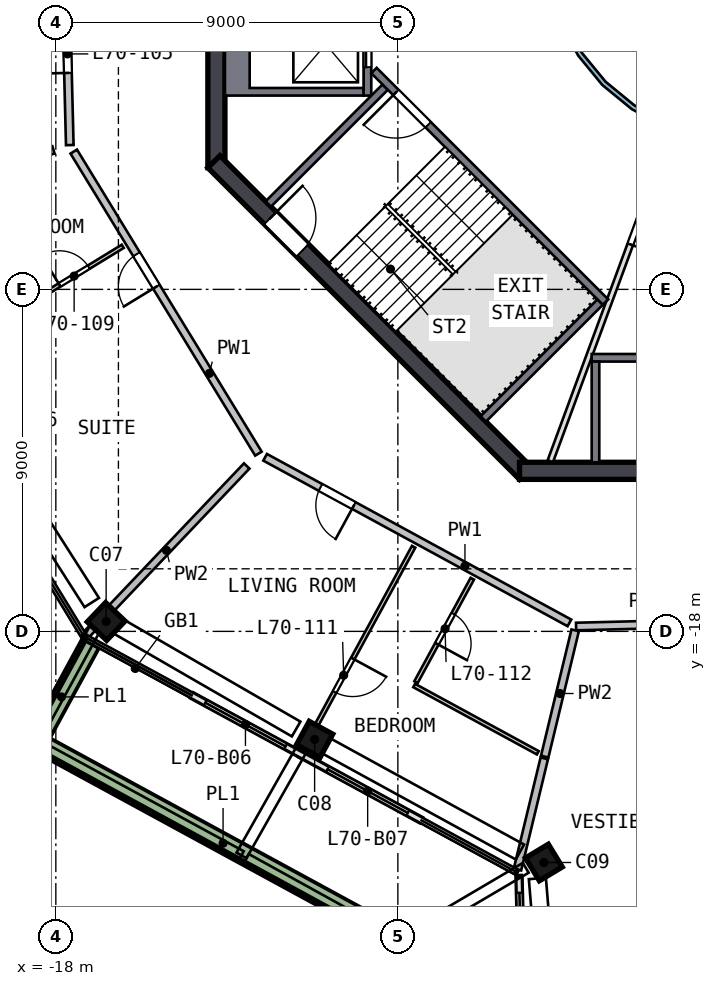
"""IFC4 building model, lengths in metres.
Left out: names, types, materials, properties, quantities, classifications, styles, units other than length and angle.
Written with IfcOpenShell. Run it as: python <this file> out.ifc"""

import sys

from ifc_helpers import new_model, si_unit, direction, frame, frame_2d, origin, origin_2d, place, context, subcontext, project, spatial, polyline, rectangle, outline, extrude, element, fill, save


model = new_model("IFC4")
c1 = context("Model", 3, precision=1e-05, world=origin(), true_north=direction((0.0, 1.0)))
c2 = subcontext(c1, "Body", "Model", "MODEL_VIEW")
j1 = project(units=[si_unit("LENGTHUNIT", "METRE"), si_unit("PLANEANGLEUNIT", "RADIAN")], contexts=[c1])
p1 = place(None, origin())
s1 = spatial("IfcSite", under=j1, at=p1, CompositionType="ELEMENT")
p2 = place(p1, origin())
s2 = spatial("IfcBuilding", under=s1, at=p2, CompositionType="ELEMENT")
p3 = place(p2, frame((0.0, 0.0, 284.5)))
s3 = spatial("IfcBuildingStorey", under=s2, at=p3, CompositionType="ELEMENT", Elevation=284.5)
p4 = place(p3, frame((-16.779, -17.644, 0.0), z_axis=(0.084609865, -0.079060431, 0.993272681), x_axis=(-0.719963223, 0.684283954, 0.115794763)))
e1 = element("IfcColumn", 1, at=p4, inside=s3, PredefinedType="COLUMN", context=c2, shape_type="SweptSolid", body=[
    extrude(rectangle(XDim=0.7, YDim=0.7, at=origin_2d()), origin(), (0.0, 0.0, 1.0), 3.211),
])
p5 = place(p3, frame((-11.311, -20.78, 0.0), z_axis=(0.099318662, -0.053005442, 0.993642907), x_axis=(0.872612609, -0.475262413, -0.112573854)))
e2 = element("IfcColumn", 2, at=p5, inside=s3, PredefinedType="COLUMN", context=c2, shape_type="SweptSolid", body=[
    extrude(rectangle(XDim=0.7, YDim=0.7, at=origin_2d()), origin(), (0.0, 0.0, 1.0), 3.21),
])
p6 = place(p3, frame((-5.297, -24.052, 0.0), z_axis=(0.11454425, -0.024246593, 0.993122207), x_axis=(-0.513885456, 0.854108924, 0.080122924)))
e3 = element("IfcColumn", 3, at=p6, inside=s3, PredefinedType="COLUMN", context=c2, shape_type="SweptSolid", body=[
    extrude(rectangle(XDim=0.7, YDim=0.7, at=origin_2d()), origin(), (0.0, 0.0, 1.0), 3.212),
])
p7 = place(p3, frame((-13.775, 5.799, 0.0), z_axis=(0.0, 0.0, 1.0), x_axis=(0.0, -1.0, 0.0)))
e4 = element("IfcWall", 4, at=p7, inside=s3, PredefinedType="SHEAR", context=c2, shape_type="SweptSolid", body=[
    extrude(rectangle(XDim=11.598, YDim=0.45, at=frame_2d((5.799, 0.0))), origin(), (0.0, 0.0, 1.0), 3.5),
])
p8 = place(p7, frame((4.899, 0.0, 0.0)))
e5 = element("IfcOpeningElement", 5, at=p8, cuts=e4, PredefinedType="OPENING", context=c2, shape_type="SweptSolid", body=[
    extrude(rectangle(XDim=1.8, YDim=2.1, at=frame_2d((0.9, 1.05))), frame((0.0, 0.235, 0.0), z_axis=(0.0, -1.0, 0.0), x_axis=(1.0, 0.0, 0.0)), (0.0, 0.0, 1.0), 0.47),
])
p9 = place(p3, frame((-13.841, -5.64, 0.0), z_axis=(0.0, 0.0, 1.0), x_axis=(0.707106781, -0.707106781, 0.0)))
e6 = element("IfcWall", 6, at=p9, inside=s3, PredefinedType="SHEAR", context=c2, shape_type="SweptSolid", body=[
    extrude(rectangle(XDim=11.598, YDim=0.45, at=frame_2d((5.799, 0.0))), origin(), (0.0, 0.0, 1.0), 3.5),
])
p10 = place(p9, frame((2.099, 0.0, 0.0)))
e7 = element("IfcOpeningElement", 7, at=p10, cuts=e6, PredefinedType="OPENING", context=c2, shape_type="SweptSolid", body=[
    extrude(rectangle(XDim=1.2, YDim=2.1, at=frame_2d((0.6, 1.05))), frame((0.0, 0.235, 0.0), z_axis=(0.0, -1.0, 0.0), x_axis=(1.0, 0.0, 0.0)), (0.0, 0.0, 1.0), 0.47),
])
p11 = place(p3, frame((-5.799, -13.775, 0.0), z_axis=(0.0, 0.0, 1.0), x_axis=(1.0, 0.0, 0.0)))
e8 = element("IfcWall", 8, at=p11, inside=s3, PredefinedType="SHEAR", context=c2, shape_type="SweptSolid", body=[
    extrude(rectangle(XDim=11.598, YDim=0.45, at=frame_2d((5.799, 0.0))), origin(), (0.0, 0.0, 1.0), 3.5),
])
p12 = place(p3, frame((-14.416, -19.687, 0.0), z_axis=(0.0, 0.0, 1.0), x_axis=(0.878288574, -0.478130925, 0.0)))
e9 = element("IfcWall", 9, at=p12, inside=s3, PredefinedType="SOLIDWALL", context=c2, shape_type="SweptSolid", body=[
    extrude(rectangle(XDim=3.25, YDim=0.15, at=frame_2d((1.625, 0.0))), origin(), (0.0, 0.0, 1.0), 2.525),
])
p13 = place(p12, frame((0.4, 0.0, 0.0)))
e10 = element("IfcOpeningElement", 10, at=p13, cuts=e9, PredefinedType="OPENING", context=c2, shape_type="SweptSolid", body=[
    extrude(rectangle(XDim=2.4, YDim=2.4, at=frame_2d((1.2, 1.2))), frame((0.0, 0.085, 0.0), z_axis=(0.0, -1.0, 0.0), x_axis=(1.0, 0.0, 0.0)), (0.0, 0.0, 1.0), 0.17),
])
p14 = place(p3, frame((-11.562, -21.241, 0.0), z_axis=(0.0, 0.0, 1.0), x_axis=(0.878337007, -0.478041947, 0.0)))
e11 = element("IfcWall", 11, at=p14, inside=s3, PredefinedType="SOLIDWALL", context=c2, shape_type="SweptSolid", body=[
    extrude(rectangle(XDim=3.611, YDim=0.15, at=frame_2d((1.806, 0.0))), origin(), (0.0, 0.0, 1.0), 2.525),
])
p15 = place(p14, frame((0.811, 0.0, 0.0)))
e12 = element("IfcOpeningElement", 12, at=p15, cuts=e11, PredefinedType="OPENING", context=c2, shape_type="SweptSolid", body=[
    extrude(rectangle(XDim=2.4, YDim=2.4, at=frame_2d((1.2, 1.2))), frame((0.0, 0.085, 0.0), z_axis=(0.0, -1.0, 0.0), x_axis=(1.0, 0.0, 0.0)), (0.0, 0.0, 1.0), 0.17),
])
p16 = place(p3, frame((-5.812, -24.482, 0.0), z_axis=(0.0, 0.0, 1.0), x_axis=(0.025100843, -0.999684924, 0.0)))
e13 = element("IfcWall", 13, at=p16, inside=s3, PredefinedType="SOLIDWALL", context=c2, shape_type="SweptSolid", body=[
    extrude(rectangle(XDim=3.2, YDim=0.15, at=frame_2d((1.6, 0.0))), origin(), (0.0, 0.0, 1.0), 2.525),
])
p17 = place(p16, frame((0.4, 0.0, 0.0)))
e14 = element("IfcOpeningElement", 14, at=p17, cuts=e13, PredefinedType="OPENING", context=c2, shape_type="SweptSolid", body=[
    extrude(rectangle(XDim=2.4, YDim=2.4, at=frame_2d((1.2, 1.2))), frame((0.0, 0.085, 0.0), z_axis=(0.0, -1.0, 0.0), x_axis=(1.0, 0.0, 0.0)), (0.0, 0.0, 1.0), 0.17),
])
p18 = place(p3, frame((-17.087, -18.319, 0.0), z_axis=(0.0, 0.0, 1.0), x_axis=(-0.478049873, -0.878332693, 0.0)))
e15 = element("IfcWall", 15, at=p18, inside=s3, PredefinedType="SOLIDWALL", context=c2, shape_type="SweptSolid", body=[
    extrude(rectangle(XDim=3.199, YDim=0.5, at=frame_2d((1.6, 0.0))), origin(), (0.0, 0.0, 1.0), 0.7),
])
p19 = place(p3, frame((-18.278, -21.029, 0.0), z_axis=(0.0, 0.0, 1.0), x_axis=(0.878313905, -0.47808439, 0.0)))
e16 = element("IfcWall", 16, at=p19, inside=s3, PredefinedType="SOLIDWALL", context=c2, shape_type="SweptSolid", body=[
    extrude(rectangle(XDim=10.652, YDim=0.5, at=frame_2d((5.326, 0.0))), origin(), (0.0, 0.0, 1.0), 0.7),
])
p20 = place(p3, origin())
e17 = element("IfcWall", 17, at=p20, inside=s3, PredefinedType="SOLIDWALL", context=c2, shape_type="SweptSolid", body=[
    extrude(outline(polyline([(-13.55, -3.9), (-13.55, -1.2), (-9.9, -1.2), (-9.9, -1.4), (-12.9, -1.4), (-12.9, -3.7), (-9.9, -3.7), (-9.9, -3.9), (-13.55, -3.9)])), origin(), (0.0, 0.0, 1.0), 3.19),
])
p21 = place(p3, frame((-9.8, -1.2, 0.0), z_axis=(0.0, 0.0, 1.0), x_axis=(0.0, -1.0, 0.0)))
e18 = element("IfcWall", 18, at=p21, inside=s3, PredefinedType="SOLIDWALL", context=c2, shape_type="SweptSolid", body=[
    extrude(rectangle(XDim=2.7, YDim=0.2, at=frame_2d((1.35, 0.0))), origin(), (0.0, 0.0, 1.0), 3.19),
])
p22 = place(p21, frame((0.75, 0.0, 0.0)))
e19 = element("IfcOpeningElement", 19, at=p22, cuts=e18, PredefinedType="OPENING", context=c2, shape_type="SweptSolid", body=[
    extrude(rectangle(XDim=1.2, YDim=2.1, at=frame_2d((0.6, 1.05))), frame((0.0, 0.11, 0.0), z_axis=(0.0, -1.0, 0.0), x_axis=(1.0, 0.0, 0.0)), (0.0, 0.0, 1.0), 0.22),
])
p23 = place(p3, frame((-3.9, -10.8, 0.0), z_axis=(0.0, 0.0, 1.0), x_axis=(1.0, 0.0, 0.0)))
e20 = element("IfcWall", 20, at=p23, inside=s3, PredefinedType="SOLIDWALL", context=c2, shape_type="SweptSolid", body=[
    extrude(rectangle(XDim=7.8, YDim=0.2, at=frame_2d((3.9, 0.0))), origin(), (0.0, 0.0, 1.0), 3.19),
])
p24 = place(p23, frame((3.45, 0.0, 0.0)))
e21 = element("IfcOpeningElement", 21, at=p24, cuts=e20, PredefinedType="OPENING", context=c2, shape_type="SweptSolid", body=[
    extrude(rectangle(XDim=0.9, YDim=2.1, at=frame_2d((0.45, 1.05))), frame((0.0, 0.11, 0.0), z_axis=(0.0, -1.0, 0.0), x_axis=(1.0, 0.0, 0.0)), (0.0, 0.0, 1.0), 0.22),
])
p25 = place(p3, frame((-3.8, -10.9, 0.0), z_axis=(0.0, 0.0, 1.0), x_axis=(0.0, -1.0, 0.0)))
e22 = element("IfcWall", 22, at=p25, inside=s3, PredefinedType="SOLIDWALL", context=c2, shape_type="SweptSolid", body=[
    extrude(rectangle(XDim=2.65, YDim=0.2, at=frame_2d((1.325, 0.0))), origin(), (0.0, 0.0, 1.0), 3.19),
])
p26 = place(p3, frame((-3.535, -9.334, 0.0), z_axis=(0.0, 0.0, 1.0), x_axis=(-0.707120946, 0.707092617, 0.0)))
e23 = element("IfcWall", 23, at=p26, inside=s3, PredefinedType="SOLIDWALL", context=c2, shape_type="SweptSolid", body=[
    extrude(rectangle(XDim=8.618, YDim=0.2, at=frame_2d((4.309, 0.0))), origin(), (0.0, 0.0, 1.0), 3.19),
])
p27 = place(p26, frame((6.6, 0.0, 0.0)))
e24 = element("IfcOpeningElement", 24, at=p27, cuts=e23, PredefinedType="OPENING", context=c2, shape_type="SweptSolid", body=[
    extrude(rectangle(XDim=1.2, YDim=2.1, at=frame_2d((0.6, 1.05))), frame((0.0, 0.11, 0.0), z_axis=(0.0, -1.0, 0.0), x_axis=(1.0, 0.0, 0.0)), (0.0, 0.0, 1.0), 0.22),
])
for number, where, z_axis, x_axis in (
    (25, (-9.334, -3.677, 0.0), (0.0, 0.0, 1.0), (-0.707, -0.707, 0.0)),
    (26, (-3.677, -9.334, 0.0), (0.0, 0.0, 1.0), (-0.707, -0.707, 0.0)),
):
    element("IfcWall", number, at=place(p3, frame(where, z_axis=z_axis, x_axis=x_axis)), inside=s3, PredefinedType="SOLIDWALL", context=c2, shape_type="SweptSolid", body=[
        extrude(rectangle(XDim=4.35, YDim=0.2, at=frame_2d((2.175, 0.0))), origin(), (0.0, 0.0, 1.0), 3.19),
    ])
p28 = place(p3, frame((-1.776, -4.813, 0.0), z_axis=(0.0, 0.0, 1.0), x_axis=(-0.346114844, -0.938192152, 0.0)))
e27 = element("IfcWall", 27, at=p28, inside=s3, PredefinedType="PARTITIONING", context=c2, shape_type="SweptSolid", body=[
    extrude(rectangle(XDim=9.283, YDim=0.15, at=frame_2d((4.641, 0.0))), origin(), (0.0, 0.0, 1.0), 3.19),
])
p29 = place(p28, frame((1.4, 0.0, 0.0)))
e28 = element("IfcOpeningElement", 28, at=p29, cuts=e27, PredefinedType="OPENING", context=c2, shape_type="SweptSolid", body=[
    extrude(rectangle(XDim=1.8, YDim=2.1, at=frame_2d((0.9, 1.05))), frame((0.0, 0.085, 0.0), z_axis=(0.0, -1.0, 0.0), x_axis=(1.0, 0.0, 0.0)), (0.0, 0.0, 1.0), 0.17),
])
p30 = place(p3, origin())
e29 = element("IfcWall", 29, at=p30, inside=s3, PredefinedType="SOLIDWALL", context=c2, shape_type="SweptSolid", body=[
    extrude(outline(polyline([(5.021, -0.999), (4.73, -1.959), (4.257, -2.844), (3.62, -3.62), (2.844, -4.257), (1.959, -4.73), (0.999, -5.021), (0.0, -5.12), (-0.999, -5.021), (-1.959, -4.73), (-2.844, -4.257), (-3.62, -3.62), (-4.257, -2.844), (-4.73, -1.959), (-5.021, -0.999), (-5.12, 0.0), (-5.021, 0.999), (-4.73, 1.959), (-4.257, 2.844), (-3.62, 3.62), (-2.844, 4.257), (-1.959, 4.73), (-0.999, 5.021), (0.0, 5.12), (0.999, 5.021), (1.959, 4.73), (2.844, 4.257), (3.62, 3.62), (4.257, 2.844), (4.73, 1.959), (5.021, 0.999), (5.12, 0.0), (5.021, -0.999)]), holes=[polyline([(4.904, 0.976), (4.619, 1.913), (4.157, 2.778), (3.535, 3.535), (2.778, 4.157), (1.913, 4.619), (0.976, 4.904), (0.0, 5.0), (-0.976, 4.904), (-1.913, 4.619), (-2.778, 4.157), (-3.535, 3.535), (-4.157, 2.778), (-4.619, 1.913), (-4.904, 0.976), (-5.0, 0.0), (-4.904, -0.976), (-4.619, -1.913), (-4.157, -2.778), (-3.535, -3.535), (-2.778, -4.157), (-1.913, -4.619), (-0.976, -4.904), (0.0, -5.0), (0.976, -4.904), (1.913, -4.619), (2.778, -4.157), (3.535, -3.535), (4.157, -2.778), (4.619, -1.913), (4.904, -0.976), (5.0, 0.0), (4.904, 0.976)])]), origin(), (0.0, 0.0, 1.0), 3.19),
])
p31 = place(p3, frame((-17.633, -5.203, 0.0), z_axis=(0.0, 0.0, 1.0), x_axis=(-0.025130335, 0.999684183, 0.0)))
e30 = element("IfcWall", 30, at=p31, inside=s3, PredefinedType="SOLIDWALL", context=c2, shape_type="SweptSolid", body=[
    extrude(rectangle(XDim=9.317, YDim=0.2, at=frame_2d((4.658, 0.0))), origin(), (0.0, 0.0, 1.0), 3.19),
])
p32 = place(p31, frame((1.9, 0.0, 0.0)))
e31 = element("IfcOpeningElement", 31, at=p32, cuts=e30, PredefinedType="OPENING", context=c2, shape_type="SweptSolid", body=[
    extrude(rectangle(XDim=1.0, YDim=2.1, at=frame_2d((0.5, 1.05))), frame((0.0, 0.11, 0.0), z_axis=(0.0, -1.0, 0.0), x_axis=(1.0, 0.0, 0.0)), (0.0, 0.0, 1.0), 0.22),
])
p33 = place(p3, frame((-12.669, -13.323, 0.0), z_axis=(0.0, 0.0, 1.0), x_axis=(-0.521611117, 0.853183358, 0.0)))
e32 = element("IfcWall", 32, at=p33, inside=s3, PredefinedType="SOLIDWALL", context=c2, shape_type="SweptSolid", body=[
    extrude(rectangle(XDim=9.317, YDim=0.2, at=frame_2d((4.658, 0.0))), origin(), (0.0, 0.0, 1.0), 3.19),
])
p34 = place(p33, frame((5.15, 0.0, 0.0)))
e33 = element("IfcOpeningElement", 33, at=p34, cuts=e32, PredefinedType="OPENING", context=c2, shape_type="SweptSolid", body=[
    extrude(rectangle(XDim=1.0, YDim=2.1, at=frame_2d((0.5, 1.05))), frame((0.0, 0.11, 0.0), z_axis=(0.0, -1.0, 0.0), x_axis=(1.0, 0.0, 0.0)), (0.0, 0.0, 1.0), 0.22),
])
p35 = place(p3, frame((-4.486, -17.777, 0.0), z_axis=(0.0, 0.0, 1.0), x_axis=(-0.878320972, 0.478071407, 0.0)))
e34 = element("IfcWall", 34, at=p35, inside=s3, PredefinedType="SOLIDWALL", context=c2, shape_type="SweptSolid", body=[
    extrude(rectangle(XDim=9.117, YDim=0.2, at=frame_2d((4.558, 0.0))), origin(), (0.0, 0.0, 1.0), 3.19),
])
p36 = place(p35, frame((6.458, 0.0, 0.0)))
e35 = element("IfcOpeningElement", 35, at=p36, cuts=e34, PredefinedType="OPENING", context=c2, shape_type="SweptSolid", body=[
    extrude(rectangle(XDim=1.0, YDim=2.1, at=frame_2d((0.5, 1.05))), frame((0.0, 0.11, 0.0), z_axis=(0.0, -1.0, 0.0), x_axis=(1.0, 0.0, 0.0)), (0.0, 0.0, 1.0), 0.22),
])
p37 = place(p3, frame((5.203, -17.633, 0.0), z_axis=(0.0, 0.0, 1.0), x_axis=(-0.999683918, -0.025140891, 0.0)))
e36 = element("IfcWall", 36, at=p37, inside=s3, PredefinedType="SOLIDWALL", context=c2, shape_type="SweptSolid", body=[
    extrude(rectangle(XDim=9.517, YDim=0.2, at=frame_2d((4.758, 0.0))), origin(), (0.0, 0.0, 1.0), 3.19),
])
p38 = place(p37, frame((3.838, 0.0, 0.0)))
e37 = element("IfcOpeningElement", 37, at=p38, cuts=e36, PredefinedType="OPENING", context=c2, shape_type="SweptSolid", body=[
    extrude(rectangle(XDim=1.8, YDim=2.1, at=frame_2d((0.9, 1.05))), frame((0.0, 0.11, 0.0), z_axis=(0.0, -1.0, 0.0), x_axis=(1.0, 0.0, 0.0)), (0.0, 0.0, 1.0), 0.22),
])
p39 = place(p3, frame((-18.062, -5.33, 0.0), z_axis=(0.0, 0.0, 1.0), x_axis=(-0.959121115, -0.282995915, 0.0)))
e38 = element("IfcWall", 38, at=p39, inside=s3, PredefinedType="SOLIDWALL", context=c2, shape_type="SweptSolid", body=[
    extrude(rectangle(XDim=3.075, YDim=0.2, at=frame_2d((1.537, 0.0))), origin(), (0.0, 0.0, 1.0), 3.19),
])
p40 = place(p3, frame((-12.977, -13.647, 0.0), z_axis=(0.0, 0.0, 1.0), x_axis=(-0.689127097, -0.724640493, 0.0)))
e39 = element("IfcWall", 39, at=p40, inside=s3, PredefinedType="SOLIDWALL", context=c2, shape_type="SweptSolid", body=[
    extrude(rectangle(XDim=6.132, YDim=0.2, at=frame_2d((3.066, 0.0))), origin(), (0.0, 0.0, 1.0), 3.19),
])
p41 = place(p3, frame((-5.853, -24.268, 0.0), z_axis=(0.0, 0.0, 1.0), x_axis=(0.234458255, 0.972126189, 0.0)))
e40 = element("IfcWall", 40, at=p41, inside=s3, PredefinedType="SOLIDWALL", context=c2, shape_type="SweptSolid", body=[
    extrude(rectangle(XDim=3.011, YDim=0.2, at=frame_2d((1.506, 0.0))), origin(), (0.0, 0.0, 1.0), 3.19),
])
p42 = place(p3, frame((-5.136, -21.296, 0.0), z_axis=(0.0, 0.0, 1.0), x_axis=(0.234461345, 0.972125443, 0.0)))
e41 = element("IfcWall", 41, at=p42, inside=s3, PredefinedType="SOLIDWALL", context=c2, shape_type="SweptSolid", body=[
    extrude(rectangle(XDim=3.418, YDim=0.2, at=frame_2d((1.709, 0.0))), origin(), (0.0, 0.0, 1.0), 3.19),
])
p43 = place(p3, frame((-18.884, -9.484, 0.0), z_axis=(0.0, 0.0, 1.0), x_axis=(0.85318253, 0.521612471, 0.0)))
e42 = element("IfcWall", 42, at=p43, inside=s3, PredefinedType="PARTITIONING", context=c2, shape_type="SweptSolid", body=[
    extrude(rectangle(XDim=3.1, YDim=0.1, at=frame_2d((1.55, 0.0))), origin(), (0.0, 0.0, 1.0), 3.19),
])
p44 = place(p43, frame((1.15, 0.0, 0.0)))
e43 = element("IfcOpeningElement", 43, at=p44, cuts=e42, PredefinedType="OPENING", context=c2, shape_type="SweptSolid", body=[
    extrude(rectangle(XDim=0.9, YDim=2.1, at=frame_2d((0.45, 1.05))), frame((0.0, 0.06, 0.0), z_axis=(0.0, -1.0, 0.0), x_axis=(1.0, 0.0, 0.0)), (0.0, 0.0, 1.0), 0.12),
])
p45 = place(p3, frame((-8.585, -15.773, 0.0), z_axis=(0.0, 0.0, 1.0), x_axis=(-0.478081504, -0.878315476, 0.0)))
e44 = element("IfcWall", 44, at=p45, inside=s3, PredefinedType="PARTITIONING", context=c2, shape_type="SweptSolid", body=[
    extrude(rectangle(XDim=6.15, YDim=0.1, at=frame_2d((3.075, 0.0))), origin(), (0.0, 0.0, 1.0), 3.19),
])
p46 = place(p45, frame((3.35, 0.0, 0.0)))
e45 = element("IfcOpeningElement", 45, at=p46, cuts=e44, PredefinedType="OPENING", context=c2, shape_type="SweptSolid", body=[
    extrude(rectangle(XDim=1.0, YDim=2.1, at=frame_2d((0.5, 1.05))), frame((0.0, 0.06, 0.0), z_axis=(0.0, -1.0, 0.0), x_axis=(1.0, 0.0, 0.0)), (0.0, 0.0, 1.0), 0.12),
])
p47 = place(p3, frame((-7.041, -16.614, 0.0), z_axis=(0.0, 0.0, 1.0), x_axis=(-0.478129117, -0.878289558, 0.0)))
e46 = element("IfcWall", 46, at=p47, inside=s3, PredefinedType="PARTITIONING", context=c2, shape_type="SweptSolid", body=[
    extrude(rectangle(XDim=3.1, YDim=0.1, at=frame_2d((1.55, 0.0))), origin(), (0.0, 0.0, 1.0), 3.19),
])
p48 = place(p47, frame((1.05, 0.0, 0.0)))
e47 = element("IfcOpeningElement", 47, at=p48, cuts=e46, PredefinedType="OPENING", context=c2, shape_type="SweptSolid", body=[
    extrude(rectangle(XDim=0.9, YDim=2.1, at=frame_2d((0.45, 1.05))), frame((0.0, 0.06, 0.0), z_axis=(0.0, -1.0, 0.0), x_axis=(1.0, 0.0, 0.0)), (0.0, 0.0, 1.0), 0.12),
])
p49 = place(p3, frame((-8.571, -19.424, 0.0), z_axis=(0.0, 0.0, 1.0), x_axis=(0.878330978, -0.478053023, 0.0)))
e48 = element("IfcWall", 48, at=p49, inside=s3, PredefinedType="PARTITIONING", context=c2, shape_type="SweptSolid", body=[
    extrude(rectangle(XDim=3.704, YDim=0.1, at=frame_2d((1.852, 0.0))), origin(), (0.0, 0.0, 1.0), 3.19),
])
p50 = place(p13, origin())
e49 = element("IfcDoor", 49, at=p50, inside=s3, OperationType="SLIDING_TO_RIGHT", PredefinedType="DOOR", context=c2, shape_type="SweptSolid", body=[
    extrude(rectangle(XDim=2.4, YDim=2.4, at=frame_2d((1.2, 1.2))), frame((0.0, 0.025, 0.0), z_axis=(0.0, -1.0, 0.0), x_axis=(1.0, 0.0, 0.0)), (0.0, 0.0, 1.0), 0.05),
])
fill(e10, e49)
p51 = place(p15, origin())
e50 = element("IfcDoor", 50, at=p51, inside=s3, OperationType="SLIDING_TO_LEFT", PredefinedType="DOOR", context=c2, shape_type="SweptSolid", body=[
    extrude(rectangle(XDim=2.4, YDim=2.4, at=frame_2d((1.2, 1.2))), frame((0.0, 0.025, 0.0), z_axis=(0.0, -1.0, 0.0), x_axis=(1.0, 0.0, 0.0)), (0.0, 0.0, 1.0), 0.05),
])
fill(e12, e50)
p52 = place(p17, origin())
e51 = element("IfcDoor", 51, at=p52, inside=s3, OperationType="SLIDING_TO_LEFT", PredefinedType="DOOR", context=c2, shape_type="SweptSolid", body=[
    extrude(rectangle(XDim=2.4, YDim=2.4, at=frame_2d((1.2, 1.2))), frame((0.0, 0.025, 0.0), z_axis=(0.0, -1.0, 0.0), x_axis=(1.0, 0.0, 0.0)), (0.0, 0.0, 1.0), 0.05),
])
fill(e14, e51)
p53 = place(p22, origin())
e52 = element("IfcDoor", 52, at=p53, inside=s3, OperationType="DOUBLE_DOOR_SLIDING", PredefinedType="DOOR", context=c2, shape_type="SweptSolid", body=[
    extrude(rectangle(XDim=1.2, YDim=2.1, at=frame_2d((0.6, 1.05))), frame((0.0, 0.025, 0.0), z_axis=(0.0, -1.0, 0.0), x_axis=(1.0, 0.0, 0.0)), (0.0, 0.0, 1.0), 0.05),
])
fill(e19, e52)
p54 = place(p27, origin())
e53 = element("IfcDoor", 53, at=p54, inside=s3, OperationType="SINGLE_SWING_RIGHT", PredefinedType="DOOR", context=c2, shape_type="SweptSolid", body=[
    extrude(rectangle(XDim=1.2, YDim=2.1, at=frame_2d((0.6, 1.05))), frame((0.0, 0.025, 0.0), z_axis=(0.0, -1.0, 0.0), x_axis=(1.0, 0.0, 0.0)), (0.0, 0.0, 1.0), 0.05),
])
fill(e24, e53)
p55 = place(p10, origin())
e54 = element("IfcDoor", 54, at=p55, inside=s3, OperationType="SINGLE_SWING_LEFT", PredefinedType="DOOR", context=c2, shape_type="SweptSolid", body=[
    extrude(rectangle(XDim=1.2, YDim=2.1, at=frame_2d((0.6, 1.05))), frame((0.0, 0.025, 0.0), z_axis=(0.0, -1.0, 0.0), x_axis=(1.0, 0.0, 0.0)), (0.0, 0.0, 1.0), 0.05),
])
fill(e7, e54)
p56 = place(p29, origin())
e55 = element("IfcDoor", 55, at=p56, inside=s3, OperationType="DOUBLE_DOOR_SINGLE_SWING", PredefinedType="DOOR", context=c2, shape_type="SweptSolid", body=[
    extrude(rectangle(XDim=1.8, YDim=2.1, at=frame_2d((0.9, 1.05))), frame((0.0, 0.025, 0.0), z_axis=(0.0, -1.0, 0.0), x_axis=(1.0, 0.0, 0.0)), (0.0, 0.0, 1.0), 0.05),
])
fill(e28, e55)
p57 = place(p32, origin())
e56 = element("IfcDoor", 56, at=p57, inside=s3, OperationType="SINGLE_SWING_LEFT", PredefinedType="DOOR", context=c2, shape_type="SweptSolid", body=[
    extrude(rectangle(XDim=1.0, YDim=2.1, at=frame_2d((0.5, 1.05))), frame((0.0, 0.025, 0.0), z_axis=(0.0, -1.0, 0.0), x_axis=(1.0, 0.0, 0.0)), (0.0, 0.0, 1.0), 0.05),
])
fill(e31, e56)
p58 = place(p34, origin())
e57 = element("IfcDoor", 57, at=p58, inside=s3, OperationType="SINGLE_SWING_LEFT", PredefinedType="DOOR", context=c2, shape_type="SweptSolid", body=[
    extrude(rectangle(XDim=1.0, YDim=2.1, at=frame_2d((0.5, 1.05))), frame((0.0, 0.025, 0.0), z_axis=(0.0, -1.0, 0.0), x_axis=(1.0, 0.0, 0.0)), (0.0, 0.0, 1.0), 0.05),
])
fill(e33, e57)
p59 = place(p44, origin())
e58 = element("IfcDoor", 58, at=p59, inside=s3, OperationType="SINGLE_SWING_LEFT", PredefinedType="DOOR", context=c2, shape_type="SweptSolid", body=[
    extrude(rectangle(XDim=0.9, YDim=2.1, at=frame_2d((0.45, 1.05))), frame((0.0, 0.025, 0.0), z_axis=(0.0, -1.0, 0.0), x_axis=(1.0, 0.0, 0.0)), (0.0, 0.0, 1.0), 0.05),
])
fill(e43, e58)
p60 = place(p36, origin())
e59 = element("IfcDoor", 59, at=p60, inside=s3, OperationType="SINGLE_SWING_LEFT", PredefinedType="DOOR", context=c2, shape_type="SweptSolid", body=[
    extrude(rectangle(XDim=1.0, YDim=2.1, at=frame_2d((0.5, 1.05))), frame((0.0, 0.025, 0.0), z_axis=(0.0, -1.0, 0.0), x_axis=(1.0, 0.0, 0.0)), (0.0, 0.0, 1.0), 0.05),
])
fill(e35, e59)
p61 = place(p46, origin())
e60 = element("IfcDoor", 60, at=p61, inside=s3, OperationType="SINGLE_SWING_LEFT", PredefinedType="DOOR", context=c2, shape_type="SweptSolid", body=[
    extrude(rectangle(XDim=1.0, YDim=2.1, at=frame_2d((0.5, 1.05))), frame((0.0, 0.025, 0.0), z_axis=(0.0, -1.0, 0.0), x_axis=(1.0, 0.0, 0.0)), (0.0, 0.0, 1.0), 0.05),
])
fill(e45, e60)
p62 = place(p48, origin())
e61 = element("IfcDoor", 61, at=p62, inside=s3, OperationType="SINGLE_SWING_RIGHT", PredefinedType="DOOR", context=c2, shape_type="SweptSolid", body=[
    extrude(rectangle(XDim=0.9, YDim=2.1, at=frame_2d((0.45, 1.05))), frame((0.0, 0.025, 0.0), z_axis=(0.0, -1.0, 0.0), x_axis=(1.0, 0.0, 0.0)), (0.0, 0.0, 1.0), 0.05),
])
fill(e47, e61)
save(model, sys.argv[1])
